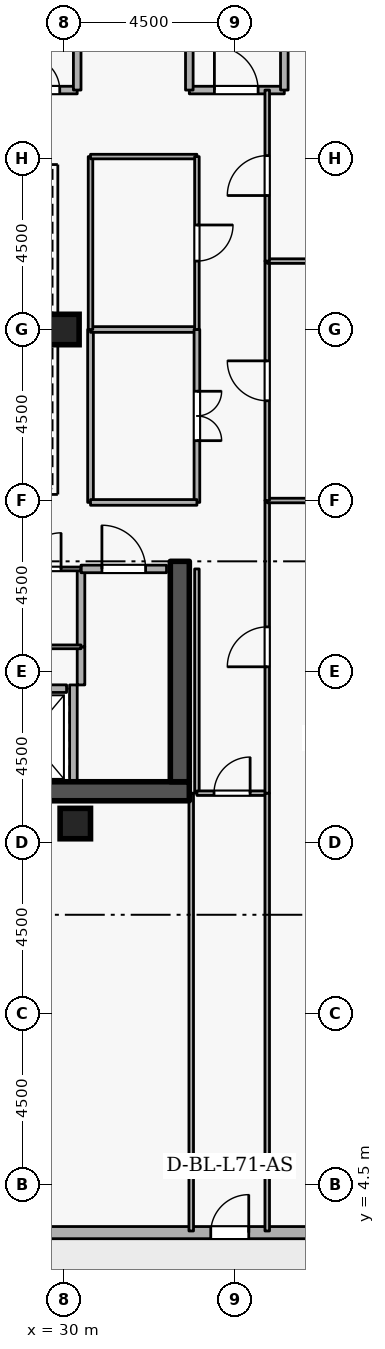
"""IFC4 building model, lengths in metres.
Left out: names, types, materials, properties, quantities, classifications, styles, units other than length and angle.
Written with IfcOpenShell. Run it as: python <this file> out.ifc"""

import sys

from ifc_helpers import new_model, si_unit, direction, frame, frame_2d, origin, origin_2d, place, context, subcontext, project, spatial, rectangle, extrude, element, fill, save


model = new_model("IFC4")
c1 = context("Model", 3, precision=1e-05, world=origin(), true_north=direction((0.0, 1.0)))
c2 = subcontext(c1, "Body", "Model", "MODEL_VIEW")
j1 = project(units=[si_unit("LENGTHUNIT", "METRE"), si_unit("PLANEANGLEUNIT", "RADIAN")], contexts=[c1])
p1 = place(None, origin())
s1 = spatial("IfcSite", under=j1, at=p1, CompositionType="ELEMENT")
p2 = place(p1, origin())
s2 = spatial("IfcBuilding", under=s1, at=p2, CompositionType="ELEMENT")
p3 = place(p2, frame((0.0, 0.0, 265.5)))
s3 = spatial("IfcBuildingStorey", under=s2, at=p3, CompositionType="ELEMENT", Elevation=265.5)
p4 = place(p3, frame((17.7, 14.85, 0.0), z_axis=(0.0, 0.0, 1.0), x_axis=(1.0, 0.0, 0.0)))
e1 = element("IfcWall", 1, at=p4, inside=s3, PredefinedType="SHEAR", context=c2, shape_type="SweptSolid", body=[
    extrude(rectangle(XDim=15.6, YDim=0.5, at=frame_2d((7.8, 0.0))), origin(), (0.0, 0.0, 1.0), 3.6),
])
p5 = place(p3, frame((33.05, 15.1, 0.0), z_axis=(0.0, 0.0, 1.0), x_axis=(0.0, 1.0, 0.0)))
e2 = element("IfcWall", 2, at=p5, inside=s3, PredefinedType="SHEAR", context=c2, shape_type="SweptSolid", body=[
    extrude(rectangle(XDim=5.8, YDim=0.5, at=frame_2d((2.9, 0.0))), origin(), (0.0, 0.0, 1.0), 3.6),
])
for number, where, z_axis, x_axis in (
    (3, (30.3, 14.0, 0.0), (0.0, 0.0, 1.0), (1.0, 0.0, 0.0)),
    (4, (30.0, 27.0, 0.0), (0.0, 0.0, 1.0), (1.0, 0.0, 0.0)),
):
    element("IfcColumn", number, at=place(p3, frame(where, z_axis=z_axis, x_axis=x_axis)), inside=s3, PredefinedType="COLUMN", context=c2, shape_type="SweptSolid", body=[
        extrude(rectangle(XDim=0.8, YDim=0.8, at=origin_2d()), origin(), (0.0, 0.0, 1.0), 3.6),
    ])
p6 = place(p3, frame((11.146, 3.238, 0.0), z_axis=(0.0, 0.0, 1.0), x_axis=(0.999999997144, -7.5574884e-05, 0.0)))
e5 = element("IfcWall", 5, at=p6, inside=s3, PredefinedType="STANDARD", context=c2, shape_type="SweptSolid", body=[
    extrude(rectangle(XDim=35.535, YDim=0.32, at=frame_2d((17.768, 0.0))), origin(), (0.0, 0.0, 1.0), 2.7),
])
p7 = place(p6, frame((22.718, 0.0, 0.0)))
e6 = element("IfcOpeningElement", 6, at=p7, cuts=e5, PredefinedType="OPENING", context=c2, shape_type="SweptSolid", body=[
    extrude(rectangle(XDim=1.0, YDim=2.08, at=frame_2d((0.5, 1.04))), frame((0.0, 0.17, 0.0), z_axis=(0.0, -1.0, 0.0), x_axis=(1.0, 0.0, 0.0)), (0.0, 0.0, 1.0), 0.34),
])
p8 = place(p6, frame((2.7, 0.0, 0.72)))
e7 = element("IfcOpeningElement", 7, at=p8, cuts=e5, PredefinedType="OPENING", context=c2, shape_type="SweptSolid", body=[
    extrude(rectangle(XDim=0.9, YDim=1.75, at=frame_2d((0.45, 0.875))), frame((0.0, 0.17, 0.0), z_axis=(0.0, -1.0, 0.0), x_axis=(1.0, 0.0, 0.0)), (0.0, 0.0, 1.0), 0.34),
])
p9 = place(p6, frame((7.5, 0.0, 0.72)))
e8 = element("IfcOpeningElement", 8, at=p9, cuts=e5, PredefinedType="OPENING", context=c2, shape_type="SweptSolid", body=[
    extrude(rectangle(XDim=0.9, YDim=1.75, at=frame_2d((0.45, 0.875))), frame((0.0, 0.17, 0.0), z_axis=(0.0, -1.0, 0.0), x_axis=(1.0, 0.0, 0.0)), (0.0, 0.0, 1.0), 0.34),
])
p10 = place(p6, frame((12.3, 0.0, 0.72)))
e9 = element("IfcOpeningElement", 9, at=p10, cuts=e5, PredefinedType="OPENING", context=c2, shape_type="SweptSolid", body=[
    extrude(rectangle(XDim=0.9, YDim=1.75, at=frame_2d((0.45, 0.875))), frame((0.0, 0.17, 0.0), z_axis=(0.0, -1.0, 0.0), x_axis=(1.0, 0.0, 0.0)), (0.0, 0.0, 1.0), 0.34),
])
p11 = place(p6, frame((17.1, 0.0, 0.72)))
e10 = element("IfcOpeningElement", 10, at=p11, cuts=e5, PredefinedType="OPENING", context=c2, shape_type="SweptSolid", body=[
    extrude(rectangle(XDim=0.9, YDim=1.75, at=frame_2d((0.45, 0.875))), frame((0.0, 0.17, 0.0), z_axis=(0.0, -1.0, 0.0), x_axis=(1.0, 0.0, 0.0)), (0.0, 0.0, 1.0), 0.34),
])
p12 = place(p6, frame((26.7, 0.0, 0.72)))
e11 = element("IfcOpeningElement", 11, at=p12, cuts=e5, PredefinedType="OPENING", context=c2, shape_type="SweptSolid", body=[
    extrude(rectangle(XDim=0.9, YDim=1.75, at=frame_2d((0.45, 0.875))), frame((0.0, 0.17, 0.0), z_axis=(0.0, -1.0, 0.0), x_axis=(1.0, 0.0, 0.0)), (0.0, 0.0, 1.0), 0.34),
])
p13 = place(p6, frame((31.5, 0.0, 0.72)))
e12 = element("IfcOpeningElement", 12, at=p13, cuts=e5, PredefinedType="OPENING", context=c2, shape_type="SweptSolid", body=[
    extrude(rectangle(XDim=0.9, YDim=1.75, at=frame_2d((0.45, 0.875))), frame((0.0, 0.17, 0.0), z_axis=(0.0, -1.0, 0.0), x_axis=(1.0, 0.0, 0.0)), (0.0, 0.0, 1.0), 0.34),
])
p14 = place(p3, frame((28.08, 17.55, 0.0), z_axis=(0.0, 0.0, 1.0), x_axis=(1.0, 0.0, 0.0)))
e13 = element("IfcWall", 13, at=p14, inside=s3, PredefinedType="STANDARD", context=c2, shape_type="SweptSolid", body=[
    extrude(rectangle(XDim=1.99, YDim=0.2, at=frame_2d((0.995, 0.0))), origin(), (0.0, 0.0, 1.0), 3.34),
])
p15 = place(p14, frame((0.485, 0.0, 0.0)))
e14 = element("IfcOpeningElement", 14, at=p15, cuts=e13, PredefinedType="OPENING", context=c2, shape_type="SweptSolid", body=[
    extrude(rectangle(XDim=1.02, YDim=2.06, at=frame_2d((0.51, 1.03))), frame((0.0, 0.11, 0.0), z_axis=(0.0, -1.0, 0.0), x_axis=(1.0, 0.0, 0.0)), (0.0, 0.0, 1.0), 0.22),
])
p16 = place(p3, frame((30.25, 15.112, 0.0), z_axis=(0.0, 0.0, 1.0), x_axis=(0.0, 1.0, 0.0)))
e15 = element("IfcWall", 15, at=p16, inside=s3, PredefinedType="STANDARD", context=c2, shape_type="SweptSolid", body=[
    extrude(rectangle(XDim=2.536, YDim=0.2, at=frame_2d((1.268, 0.0))), origin(), (0.0, 0.0, 1.0), 3.34),
])
p17 = place(p3, frame((33.3, 33.3, 0.0), z_axis=(0.0, 0.0, 1.0), x_axis=(1.0, 0.0, 0.0)))
e16 = element("IfcWall", 16, at=p17, inside=s3, PredefinedType="STANDARD", context=c2, shape_type="SweptSolid", body=[
    extrude(rectangle(XDim=2.5, YDim=0.2, at=frame_2d((1.25, 0.0))), origin(), (0.0, 0.0, 1.0), 3.34),
])
p18 = place(p17, frame((0.66, 0.0, 0.0)))
e17 = element("IfcOpeningElement", 17, at=p18, cuts=e16, PredefinedType="OPENING", context=c2, shape_type="SweptSolid", body=[
    extrude(rectangle(XDim=1.15, YDim=2.1, at=frame_2d((0.575, 1.05))), frame((0.0, 0.11, 0.0), z_axis=(0.0, -1.0, 0.0), x_axis=(1.0, 0.0, 0.0)), (0.0, 0.0, 1.0), 0.22),
])
p19 = place(p3, frame((35.8, 33.3, 0.0), z_axis=(0.0, 0.0, 1.0), x_axis=(0.0, 1.0, 0.0)))
e18 = element("IfcWall", 18, at=p19, inside=s3, PredefinedType="STANDARD", context=c2, shape_type="SweptSolid", body=[
    extrude(rectangle(XDim=5.7, YDim=0.2, at=frame_2d((2.85, 0.0))), origin(), (0.0, 0.0, 1.0), 3.34),
])
p20 = place(p3, frame((33.3, 35.6, 0.0), z_axis=(0.0, 0.0, 1.0), x_axis=(0.0, -1.0, 0.0)))
e19 = element("IfcWall", 19, at=p20, inside=s3, PredefinedType="STANDARD", context=c2, shape_type="SweptSolid", body=[
    extrude(rectangle(XDim=2.3, YDim=0.2, at=frame_2d((1.15, 0.0))), origin(), (0.0, 0.0, 1.0), 2.545),
])
p21 = place(p3, frame((28.55, 33.3, 0.0), z_axis=(0.0, 0.0, 1.0), x_axis=(1.0, 0.0, 0.0)))
e20 = element("IfcWall", 20, at=p21, inside=s3, PredefinedType="STANDARD", context=c2, shape_type="SweptSolid", body=[
    extrude(rectangle(XDim=1.8, YDim=0.2, at=frame_2d((0.9, 0.0))), origin(), (0.0, 0.0, 1.0), 3.34),
])
p22 = place(p21, frame((0.46, 0.0, 0.0)))
e21 = element("IfcOpeningElement", 21, at=p22, cuts=e20, PredefinedType="OPENING", context=c2, shape_type="SweptSolid", body=[
    extrude(rectangle(XDim=0.88, YDim=2.04, at=frame_2d((0.44, 1.02))), frame((0.0, 0.11, 0.0), z_axis=(0.0, -1.0, 0.0), x_axis=(1.0, 0.0, 0.0)), (0.0, 0.0, 1.0), 0.22),
])
p23 = place(p3, frame((30.35, 33.3, 0.0), z_axis=(0.0, 0.0, 1.0), x_axis=(0.0, 1.0, 0.0)))
e22 = element("IfcWall", 22, at=p23, inside=s3, PredefinedType="STANDARD", context=c2, shape_type="SweptSolid", body=[
    extrude(rectangle(XDim=2.05, YDim=0.2, at=frame_2d((1.025, 0.0))), origin(), (0.0, 0.0, 1.0), 3.34),
])
p24 = place(p3, frame((30.45, 17.648, 0.0), z_axis=(0.0, 0.0, 1.0), x_axis=(0.0, 1.0, 0.0)))
e23 = element("IfcWall", 23, at=p24, inside=s3, PredefinedType="STANDARD", context=c2, shape_type="SweptSolid", body=[
    extrude(rectangle(XDim=1.002, YDim=0.2, at=frame_2d((0.501, 0.0))), origin(), (0.0, 0.0, 1.0), 3.34),
])
p25 = place(p3, frame((30.45, 18.65, 0.0), z_axis=(0.0, 0.0, 1.0), x_axis=(0.0, 1.0, 0.0)))
e24 = element("IfcWall", 24, at=p25, inside=s3, PredefinedType="STANDARD", context=c2, shape_type="SweptSolid", body=[
    extrude(rectangle(XDim=2.05, YDim=0.2, at=frame_2d((1.025, 0.0))), origin(), (0.0, 0.0, 1.0), 3.34),
])
p26 = place(p3, frame((30.45, 20.7, 0.0), z_axis=(0.0, 0.0, 1.0), x_axis=(1.0, 0.0, 0.0)))
e25 = element("IfcWall", 25, at=p26, inside=s3, PredefinedType="STANDARD", context=c2, shape_type="SweptSolid", body=[
    extrude(rectangle(XDim=2.25, YDim=0.2, at=frame_2d((1.125, 0.0))), origin(), (0.0, 0.0, 1.0), 3.34),
])
p27 = place(p26, frame((0.55, 0.0, 0.0)))
e26 = element("IfcOpeningElement", 26, at=p27, cuts=e25, PredefinedType="OPENING", context=c2, shape_type="SweptSolid", body=[
    extrude(rectangle(XDim=1.15, YDim=2.1, at=frame_2d((0.575, 1.05))), frame((0.0, 0.11, 0.0), z_axis=(0.0, -1.0, 0.0), x_axis=(1.0, 0.0, 0.0)), (0.0, 0.0, 1.0), 0.22),
])
p28 = place(p3, frame((30.45, 18.65, 0.0), z_axis=(0.0, 0.0, 1.0), x_axis=(-1.0, 0.0, 0.0)))
e27 = element("IfcWall", 27, at=p28, inside=s3, PredefinedType="PARTITIONING", context=c2, shape_type="SweptSolid", body=[
    extrude(rectangle(XDim=2.0, YDim=0.1, at=frame_2d((1.0, 0.0))), origin(), (0.0, 0.0, 1.0), 3.34),
])
p29 = place(p3, frame((28.45, 20.7, 0.0), z_axis=(0.0, 0.0, 1.0), x_axis=(1.0, 0.0, 0.0)))
e28 = element("IfcWall", 28, at=p29, inside=s3, PredefinedType="PARTITIONING", context=c2, shape_type="SweptSolid", body=[
    extrude(rectangle(XDim=2.0, YDim=0.1, at=frame_2d((1.0, 0.0))), origin(), (0.0, 0.0, 1.0), 3.34),
])
p30 = place(p29, frame((0.525, 0.0, 0.0)))
e29 = element("IfcOpeningElement", 29, at=p30, cuts=e28, PredefinedType="OPENING", context=c2, shape_type="SweptSolid", body=[
    extrude(rectangle(XDim=0.95, YDim=2.1, at=frame_2d((0.475, 1.05))), frame((0.0, 0.06, 0.0), z_axis=(0.0, -1.0, 0.0), x_axis=(1.0, 0.0, 0.0)), (0.0, 0.0, 1.0), 0.12),
])
p31 = place(p3, frame((33.5, 20.7, 0.0), z_axis=(0.0, 0.0, 1.0), x_axis=(0.0, -1.0, 0.0)))
e30 = element("IfcWall", 30, at=p31, inside=s3, PredefinedType="PARTITIONING", context=c2, shape_type="SweptSolid", body=[
    extrude(rectangle(XDim=5.9, YDim=0.12, at=frame_2d((2.95, 0.0))), origin(), (0.0, 0.0, 1.0), 3.34),
])
p32 = place(p3, frame((33.5, 14.8, 0.0), z_axis=(0.0, 0.0, 1.0), x_axis=(1.0, 0.0, 0.0)))
e31 = element("IfcWall", 31, at=p32, inside=s3, PredefinedType="PARTITIONING", context=c2, shape_type="SweptSolid", body=[
    extrude(rectangle(XDim=1.85, YDim=0.12, at=frame_2d((0.925, 0.0))), origin(), (0.0, 0.0, 1.0), 3.34),
])
p33 = place(p32, frame((0.45, 0.0, 0.0)))
e32 = element("IfcOpeningElement", 32, at=p33, cuts=e31, PredefinedType="OPENING", context=c2, shape_type="SweptSolid", body=[
    extrude(rectangle(XDim=0.95, YDim=2.1, at=frame_2d((0.475, 1.05))), frame((0.0, 0.07, 0.0), z_axis=(0.0, -1.0, 0.0), x_axis=(1.0, 0.0, 0.0)), (0.0, 0.0, 1.0), 0.14),
])
for number, where, z_axis, x_axis in (
    (33, (35.35, 14.8, 0.0), (0.0, 0.0, 1.0), (0.0, -1.0, 0.0)),
    (34, (33.35, 3.28, 0.0), (0.0, 0.0, 1.0), (0.0, 1.0, 0.0)),
):
    element("IfcWall", number, at=place(p3, frame(where, z_axis=z_axis, x_axis=x_axis)), inside=s3, PredefinedType="PARTITIONING", context=c2, shape_type="SweptSolid", body=[
        extrude(rectangle(XDim=11.52, YDim=0.12, at=frame_2d((5.76, 0.0))), origin(), (0.0, 0.0, 1.0), 3.34),
    ])
p34 = place(p3, frame((35.35, 14.8, 0.0), z_axis=(0.0, 0.0, 1.0), x_axis=(0.0, 1.0, 0.0)))
e35 = element("IfcWall", 35, at=p34, inside=s3, PredefinedType="PARTITIONING", context=c2, shape_type="SweptSolid", body=[
    extrude(rectangle(XDim=7.7, YDim=0.12, at=frame_2d((3.85, 0.0))), origin(), (0.0, 0.0, 1.0), 3.34),
])
p35 = place(p34, frame((3.325, 0.0, 0.0)))
e36 = element("IfcOpeningElement", 36, at=p35, cuts=e35, PredefinedType="OPENING", context=c2, shape_type="SweptSolid", body=[
    extrude(rectangle(XDim=1.05, YDim=2.1, at=frame_2d((0.525, 1.05))), frame((0.0, 0.07, 0.0), z_axis=(0.0, -1.0, 0.0), x_axis=(1.0, 0.0, 0.0)), (0.0, 0.0, 1.0), 0.14),
])
p36 = place(p3, frame((35.35, 22.5, 0.0), z_axis=(0.0, 0.0, 1.0), x_axis=(1.0, 0.0, 0.0)))
e37 = element("IfcWall", 37, at=p36, inside=s3, PredefinedType="PARTITIONING", context=c2, shape_type="SweptSolid", body=[
    extrude(rectangle(XDim=13.87, YDim=0.12, at=frame_2d((6.935, 0.0))), origin(), (0.0, 0.0, 1.0), 3.34),
])
p37 = place(p3, frame((35.35, 22.5, 0.0), z_axis=(0.0, 0.0, 1.0), x_axis=(0.0, 1.0, 0.0)))
e38 = element("IfcWall", 38, at=p37, inside=s3, PredefinedType="PARTITIONING", context=c2, shape_type="SweptSolid", body=[
    extrude(rectangle(XDim=6.3, YDim=0.12, at=frame_2d((3.15, 0.0))), origin(), (0.0, 0.0, 1.0), 3.34),
])
p38 = place(p37, frame((2.625, 0.0, 0.0)))
e39 = element("IfcOpeningElement", 39, at=p38, cuts=e38, PredefinedType="OPENING", context=c2, shape_type="SweptSolid", body=[
    extrude(rectangle(XDim=1.05, YDim=2.1, at=frame_2d((0.525, 1.05))), frame((0.0, 0.07, 0.0), z_axis=(0.0, -1.0, 0.0), x_axis=(1.0, 0.0, 0.0)), (0.0, 0.0, 1.0), 0.14),
])
p39 = place(p3, frame((35.35, 28.8, 0.0), z_axis=(0.0, 0.0, 1.0), x_axis=(1.0, 0.0, 0.0)))
e40 = element("IfcWall", 40, at=p39, inside=s3, PredefinedType="PARTITIONING", context=c2, shape_type="SweptSolid", body=[
    extrude(rectangle(XDim=13.87, YDim=0.12, at=frame_2d((6.935, 0.0))), origin(), (0.0, 0.0, 1.0), 3.34),
])
p40 = place(p3, frame((35.35, 28.8, 0.0), z_axis=(0.0, 0.0, 1.0), x_axis=(0.0, 1.0, 0.0)))
e41 = element("IfcWall", 41, at=p40, inside=s3, PredefinedType="PARTITIONING", context=c2, shape_type="SweptSolid", body=[
    extrude(rectangle(XDim=4.5, YDim=0.12, at=frame_2d((2.25, 0.0))), origin(), (0.0, 0.0, 1.0), 3.34),
])
p41 = place(p40, frame((1.725, 0.0, 0.0)))
e42 = element("IfcOpeningElement", 42, at=p41, cuts=e41, PredefinedType="OPENING", context=c2, shape_type="SweptSolid", body=[
    extrude(rectangle(XDim=1.05, YDim=2.1, at=frame_2d((0.525, 1.05))), frame((0.0, 0.07, 0.0), z_axis=(0.0, -1.0, 0.0), x_axis=(1.0, 0.0, 0.0)), (0.0, 0.0, 1.0), 0.14),
])
p42 = place(p3, frame((30.7, 22.45, 0.0), z_axis=(0.0, 0.0, 1.0), x_axis=(0.0, 1.0, 0.0)))
e43 = element("IfcWall", 43, at=p42, inside=s3, PredefinedType="PARTITIONING", context=c2, shape_type="SweptSolid", body=[
    extrude(rectangle(XDim=4.55, YDim=0.15, at=frame_2d((2.275, 0.0))), origin(), (0.0, 0.0, 1.0), 3.34),
])
p43 = place(p3, frame((30.7, 27.0, 0.0), z_axis=(0.0, 0.0, 1.0), x_axis=(1.0, 0.0, 0.0)))
e44 = element("IfcWall", 44, at=p43, inside=s3, PredefinedType="PARTITIONING", context=c2, shape_type="SweptSolid", body=[
    extrude(rectangle(XDim=2.8, YDim=0.15, at=frame_2d((1.4, 0.0))), origin(), (0.0, 0.0, 1.0), 3.34),
])
p44 = place(p3, frame((33.5, 27.0, 0.0), z_axis=(0.0, 0.0, 1.0), x_axis=(0.0, -1.0, 0.0)))
e45 = element("IfcWall", 45, at=p44, inside=s3, PredefinedType="PARTITIONING", context=c2, shape_type="SweptSolid", body=[
    extrude(rectangle(XDim=4.55, YDim=0.15, at=frame_2d((2.275, 0.0))), origin(), (0.0, 0.0, 1.0), 3.34),
])
p45 = place(p44, frame((1.625, 0.0, 0.0)))
e46 = element("IfcOpeningElement", 46, at=p45, cuts=e45, PredefinedType="OPENING", context=c2, shape_type="SweptSolid", body=[
    extrude(rectangle(XDim=1.3, YDim=2.12, at=frame_2d((0.65, 1.06))), frame((0.0, 0.085, 0.0), z_axis=(0.0, -1.0, 0.0), x_axis=(1.0, 0.0, 0.0)), (0.0, 0.0, 1.0), 0.17),
])
p46 = place(p3, frame((33.5, 22.45, 0.0), z_axis=(0.0, 0.0, 1.0), x_axis=(-1.0, 0.0, 0.0)))
e47 = element("IfcWall", 47, at=p46, inside=s3, PredefinedType="PARTITIONING", context=c2, shape_type="SweptSolid", body=[
    extrude(rectangle(XDim=2.8, YDim=0.15, at=frame_2d((1.4, 0.0))), origin(), (0.0, 0.0, 1.0), 3.34),
])
p47 = place(p3, frame((30.7, 27.0, 0.0), z_axis=(0.0, 0.0, 1.0), x_axis=(0.0, 1.0, 0.0)))
e48 = element("IfcWall", 48, at=p47, inside=s3, PredefinedType="PARTITIONING", context=c2, shape_type="SweptSolid", body=[
    extrude(rectangle(XDim=4.55, YDim=0.12, at=frame_2d((2.275, 0.0))), origin(), (0.0, 0.0, 1.0), 3.34),
])
p48 = place(p3, frame((30.7, 31.55, 0.0), z_axis=(0.0, 0.0, 1.0), x_axis=(1.0, 0.0, 0.0)))
e49 = element("IfcWall", 49, at=p48, inside=s3, PredefinedType="PARTITIONING", context=c2, shape_type="SweptSolid", body=[
    extrude(rectangle(XDim=2.8, YDim=0.12, at=frame_2d((1.4, 0.0))), origin(), (0.0, 0.0, 1.0), 3.34),
])
p49 = place(p3, frame((33.5, 31.55, 0.0), z_axis=(0.0, 0.0, 1.0), x_axis=(0.0, -1.0, 0.0)))
e50 = element("IfcWall", 50, at=p49, inside=s3, PredefinedType="PARTITIONING", context=c2, shape_type="SweptSolid", body=[
    extrude(rectangle(XDim=4.55, YDim=0.12, at=frame_2d((2.275, 0.0))), origin(), (0.0, 0.0, 1.0), 3.34),
])
p50 = place(p49, frame((1.8, 0.0, 0.0)))
e51 = element("IfcOpeningElement", 51, at=p50, cuts=e50, PredefinedType="OPENING", context=c2, shape_type="SweptSolid", body=[
    extrude(rectangle(XDim=0.95, YDim=2.1, at=frame_2d((0.475, 1.05))), frame((0.0, 0.07, 0.0), z_axis=(0.0, -1.0, 0.0), x_axis=(1.0, 0.0, 0.0)), (0.0, 0.0, 1.0), 0.14),
])
p51 = place(p7, origin())
e52 = element("IfcDoor", 52, at=p51, inside=s3, OperationType="SINGLE_SWING_RIGHT", PredefinedType="DOOR", context=c2, shape_type="SweptSolid", body=[
    extrude(rectangle(XDim=1.0, YDim=2.08, at=frame_2d((0.5, 1.04))), frame((0.0, 0.025, 0.0), z_axis=(0.0, -1.0, 0.0), x_axis=(1.0, 0.0, 0.0)), (0.0, 0.0, 1.0), 0.05),
])
fill(e6, e52)
p52 = place(p18, origin())
e53 = element("IfcDoor", 53, at=p52, inside=s3, OperationType="SINGLE_SWING_LEFT", PredefinedType="DOOR", context=c2, shape_type="SweptSolid", body=[
    extrude(rectangle(XDim=1.15, YDim=2.1, at=frame_2d((0.575, 1.05))), frame((0.0, 0.025, 0.0), z_axis=(0.0, -1.0, 0.0), x_axis=(1.0, 0.0, 0.0)), (0.0, 0.0, 1.0), 0.05),
])
fill(e17, e53)
p53 = place(p22, origin())
e54 = element("IfcDoor", 54, at=p53, inside=s3, OperationType="SINGLE_SWING_LEFT", PredefinedType="DOOR", context=c2, shape_type="SweptSolid", body=[
    extrude(rectangle(XDim=0.88, YDim=2.04, at=frame_2d((0.44, 1.02))), frame((0.0, 0.025, 0.0), z_axis=(0.0, -1.0, 0.0), x_axis=(1.0, 0.0, 0.0)), (0.0, 0.0, 1.0), 0.05),
])
fill(e21, e54)
p54 = place(p30, origin())
e55 = element("IfcDoor", 55, at=p54, inside=s3, OperationType="SINGLE_SWING_RIGHT", PredefinedType="DOOR", context=c2, shape_type="SweptSolid", body=[
    extrude(rectangle(XDim=0.95, YDim=2.1, at=frame_2d((0.475, 1.05))), frame((0.0, 0.025, 0.0), z_axis=(0.0, -1.0, 0.0), x_axis=(1.0, 0.0, 0.0)), (0.0, 0.0, 1.0), 0.05),
])
fill(e29, e55)
p55 = place(p27, origin())
e56 = element("IfcDoor", 56, at=p55, inside=s3, OperationType="SINGLE_SWING_LEFT", PredefinedType="DOOR", context=c2, shape_type="SweptSolid", body=[
    extrude(rectangle(XDim=1.15, YDim=2.1, at=frame_2d((0.575, 1.05))), frame((0.0, 0.025, 0.0), z_axis=(0.0, -1.0, 0.0), x_axis=(1.0, 0.0, 0.0)), (0.0, 0.0, 1.0), 0.05),
])
fill(e26, e56)
p56 = place(p33, origin())
e57 = element("IfcDoor", 57, at=p56, inside=s3, OperationType="SINGLE_SWING_RIGHT", PredefinedType="DOOR", context=c2, shape_type="SweptSolid", body=[
    extrude(rectangle(XDim=0.95, YDim=2.1, at=frame_2d((0.475, 1.05))), frame((0.0, 0.025, 0.0), z_axis=(0.0, -1.0, 0.0), x_axis=(1.0, 0.0, 0.0)), (0.0, 0.0, 1.0), 0.05),
])
fill(e32, e57)
p57 = place(p35, origin())
e58 = element("IfcDoor", 58, at=p57, inside=s3, OperationType="SINGLE_SWING_LEFT", PredefinedType="DOOR", context=c2, shape_type="SweptSolid", body=[
    extrude(rectangle(XDim=1.05, YDim=2.1, at=frame_2d((0.525, 1.05))), frame((0.0, 0.025, 0.0), z_axis=(0.0, -1.0, 0.0), x_axis=(1.0, 0.0, 0.0)), (0.0, 0.0, 1.0), 0.05),
])
fill(e36, e58)
p58 = place(p38, origin())
e59 = element("IfcDoor", 59, at=p58, inside=s3, OperationType="SINGLE_SWING_RIGHT", PredefinedType="DOOR", context=c2, shape_type="SweptSolid", body=[
    extrude(rectangle(XDim=1.05, YDim=2.1, at=frame_2d((0.525, 1.05))), frame((0.0, 0.025, 0.0), z_axis=(0.0, -1.0, 0.0), x_axis=(1.0, 0.0, 0.0)), (0.0, 0.0, 1.0), 0.05),
])
fill(e39, e59)
p59 = place(p41, origin())
e60 = element("IfcDoor", 60, at=p59, inside=s3, OperationType="SINGLE_SWING_LEFT", PredefinedType="DOOR", context=c2, shape_type="SweptSolid", body=[
    extrude(rectangle(XDim=1.05, YDim=2.1, at=frame_2d((0.525, 1.05))), frame((0.0, 0.025, 0.0), z_axis=(0.0, -1.0, 0.0), x_axis=(1.0, 0.0, 0.0)), (0.0, 0.0, 1.0), 0.05),
])
fill(e42, e60)
p60 = place(p45, origin())
e61 = element("IfcDoor", 61, at=p60, inside=s3, OperationType="DOUBLE_DOOR_SINGLE_SWING", PredefinedType="DOOR", context=c2, shape_type="SweptSolid", body=[
    extrude(rectangle(XDim=1.3, YDim=2.12, at=frame_2d((0.65, 1.06))), frame((0.0, 0.025, 0.0), z_axis=(0.0, -1.0, 0.0), x_axis=(1.0, 0.0, 0.0)), (0.0, 0.0, 1.0), 0.05),
])
fill(e46, e61)
p61 = place(p50, origin())
e62 = element("IfcDoor", 62, at=p61, inside=s3, OperationType="SINGLE_SWING_LEFT", PredefinedType="DOOR", context=c2, shape_type="SweptSolid", body=[
    extrude(rectangle(XDim=0.95, YDim=2.1, at=frame_2d((0.475, 1.05))), frame((0.0, 0.025, 0.0), z_axis=(0.0, -1.0, 0.0), x_axis=(1.0, 0.0, 0.0)), (0.0, 0.0, 1.0), 0.05),
])
fill(e51, e62)
save(model, sys.argv[1])
